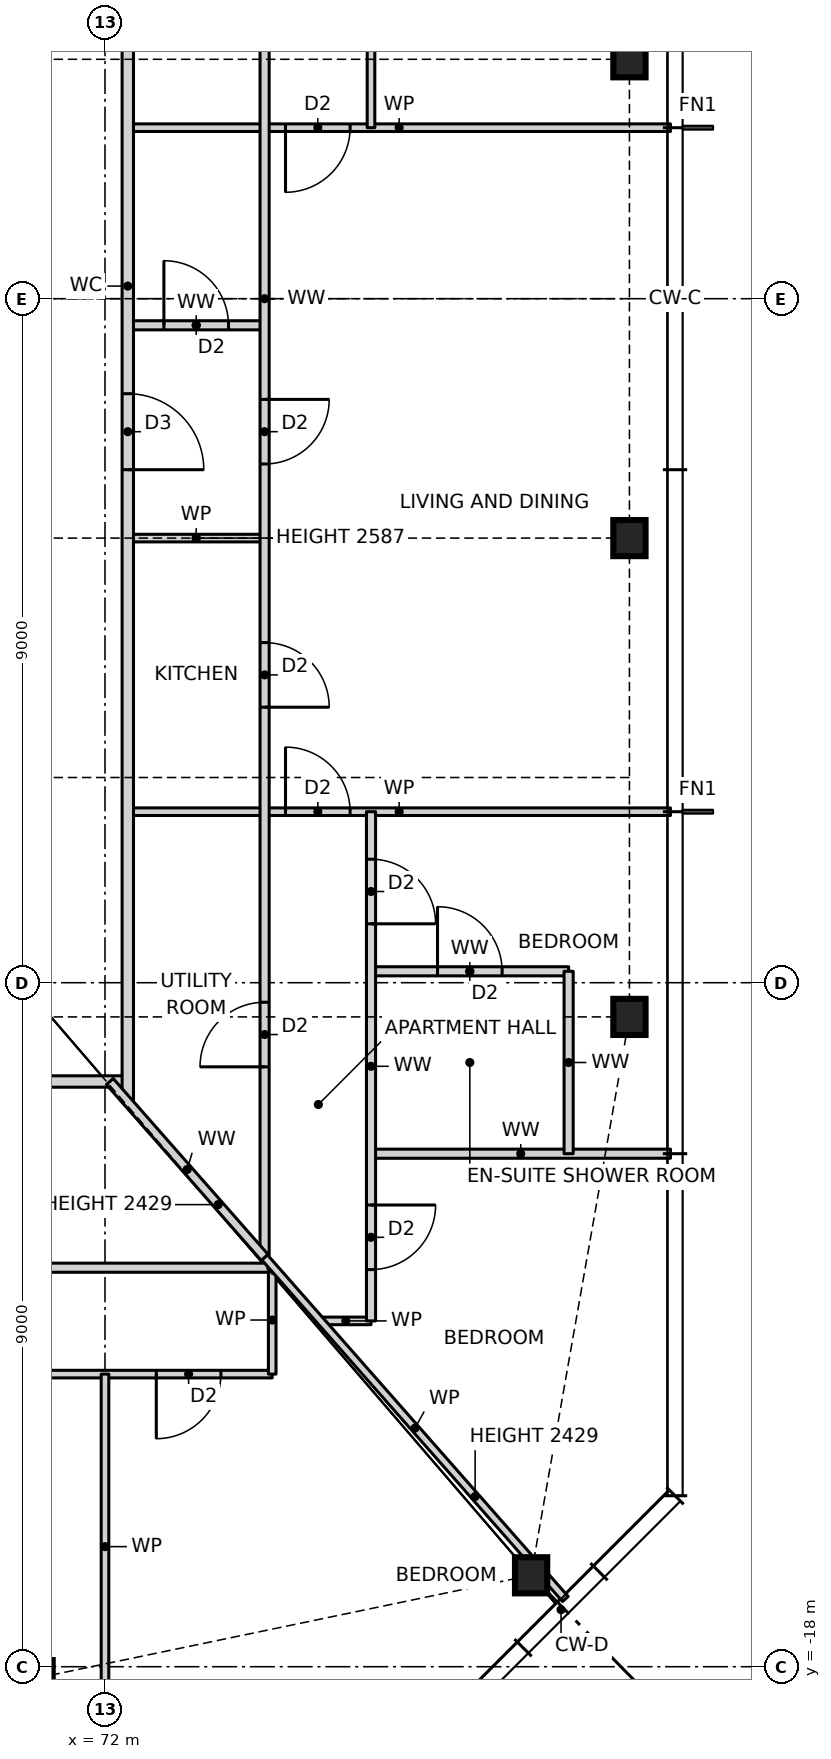
"""IFC4 building model, lengths in metres.
Left out: names, types, materials, properties, quantities, classifications, styles, units other than length and angle.
Written with IfcOpenShell. Run it as: python <this file> out.ifc"""

import sys

from ifc_helpers import new_model, si_unit, direction, frame, frame_2d, origin, origin_2d, place, context, subcontext, project, spatial, rectangle, i_section, extrude, element, fill, save


model = new_model("IFC4")
c1 = context("Model", 3, precision=1e-05, world=origin(), true_north=direction((0.0, 1.0)))
c2 = subcontext(c1, "Body", "Model", "MODEL_VIEW")
j1 = project(units=[si_unit("LENGTHUNIT", "METRE"), si_unit("PLANEANGLEUNIT", "RADIAN")], contexts=[c1])
p1 = place(None, origin())
s1 = spatial("IfcSite", under=j1, at=p1, CompositionType="ELEMENT")
p2 = place(p1, origin())
s2 = spatial("IfcBuilding", under=s1, at=p2, CompositionType="ELEMENT")
p3 = place(p2, frame((0.0, 0.0, 36.0)))
s3 = spatial("IfcBuildingStorey", under=s2, at=p3, CompositionType="ELEMENT", Elevation=36.0)
for number, where, z_axis, x_axis in (
    (1, (71.1, -18.15, 0.0), (0.0, 0.0, 1.0), (1.0, 0.0, 0.0)),
    (2, (77.606, -16.797, 0.0), (0.0, 0.0, 1.0), (1.0, 0.0, 0.0)),
    (3, (78.9, -9.45, 0.0), (0.0, 0.0, 1.0), (1.0, 0.0, 0.0)),
    (4, (78.9, -3.15, 0.0), (0.0, 0.0, 1.0), (1.0, 0.0, 0.0)),
    (5, (78.9, 3.15, 0.0), (0.0, 0.0, 1.0), (1.0, 0.0, 0.0)),
):
    element("IfcColumn", number, at=place(p3, frame(where, z_axis=z_axis, x_axis=x_axis)), inside=s3, PredefinedType="COLUMN", context=c2, shape_type="SweptSolid", body=[
        extrude(i_section(OverallWidth=0.424, OverallDepth=0.475, WebThickness=0.048, FlangeThickness=0.077, at=origin_2d()), origin(), (0.0, 0.0, 1.0), 3.5),
    ])
p4 = place(p3, frame((63.0, -14.15, 0.0), z_axis=(0.0, 0.0, 1.0), x_axis=(1.0, 0.0, 0.0)))
e6 = element("IfcWall", 6, at=p4, inside=s3, PredefinedType="PARTITIONING", context=c2, shape_type="SweptSolid", body=[
    extrude(rectangle(XDim=11.2, YDim=0.1, at=frame_2d((5.6, 0.0))), origin(), (0.0, 0.0, 1.0), 3.27),
])
p5 = place(p4, frame((1.825, 0.0, 0.0)))
e7 = element("IfcOpeningElement", 7, at=p5, cuts=e6, PredefinedType="OPENING", context=c2, shape_type="SweptSolid", body=[
    extrude(rectangle(XDim=0.85, YDim=2.1, at=frame_2d((0.425, 1.05))), frame((0.0, 0.06, 0.0), z_axis=(0.0, -1.0, 0.0), x_axis=(1.0, 0.0, 0.0)), (0.0, 0.0, 1.0), 0.12),
])
p6 = place(p4, frame((6.325, 0.0, 0.0)))
e8 = element("IfcOpeningElement", 8, at=p6, cuts=e6, PredefinedType="OPENING", context=c2, shape_type="SweptSolid", body=[
    extrude(rectangle(XDim=0.85, YDim=2.1, at=frame_2d((0.425, 1.05))), frame((0.0, 0.06, 0.0), z_axis=(0.0, -1.0, 0.0), x_axis=(1.0, 0.0, 0.0)), (0.0, 0.0, 1.0), 0.12),
])
p7 = place(p4, frame((9.675, 0.0, 0.0)))
e9 = element("IfcOpeningElement", 9, at=p7, cuts=e6, PredefinedType="OPENING", context=c2, shape_type="SweptSolid", body=[
    extrude(rectangle(XDim=0.85, YDim=2.1, at=frame_2d((0.425, 1.05))), frame((0.0, 0.06, 0.0), z_axis=(0.0, -1.0, 0.0), x_axis=(1.0, 0.0, 0.0)), (0.0, 0.0, 1.0), 0.12),
])
p8 = place(p3, frame((74.836, -13.45, 0.0), z_axis=(0.0, 0.0, 1.0), x_axis=(1.0, 0.0, 0.0)))
e10 = element("IfcWall", 10, at=p8, inside=s3, PredefinedType="PARTITIONING", context=c2, shape_type="SweptSolid", body=[
    extrude(rectangle(XDim=0.664, YDim=0.1, at=frame_2d((0.332, 0.0))), origin(), (0.0, 0.0, 1.0), 3.27),
])
p9 = place(p3, frame((54.0, -12.75, 0.0), z_axis=(0.0, 0.0, 1.0), x_axis=(1.0, 0.0, 0.0)))
e11 = element("IfcWall", 11, at=p9, inside=s3, PredefinedType="PARTITIONING", context=c2, shape_type="SweptSolid", body=[
    extrude(rectangle(XDim=20.2, YDim=0.12, at=frame_2d((10.1, 0.0))), origin(), (0.0, 0.0, 1.0), 3.27),
])
p10 = place(p9, frame((1.375, 0.0, 0.0)))
e12 = element("IfcOpeningElement", 12, at=p10, cuts=e11, PredefinedType="OPENING", context=c2, shape_type="SweptSolid", body=[
    extrude(rectangle(XDim=0.85, YDim=2.1, at=frame_2d((0.425, 1.05))), frame((0.0, 0.07, 0.0), z_axis=(0.0, -1.0, 0.0), x_axis=(1.0, 0.0, 0.0)), (0.0, 0.0, 1.0), 0.14),
])
p11 = place(p9, frame((4.575, 0.0, 0.0)))
e13 = element("IfcOpeningElement", 13, at=p11, cuts=e11, PredefinedType="OPENING", context=c2, shape_type="SweptSolid", body=[
    extrude(rectangle(XDim=0.85, YDim=2.1, at=frame_2d((0.425, 1.05))), frame((0.0, 0.07, 0.0), z_axis=(0.0, -1.0, 0.0), x_axis=(1.0, 0.0, 0.0)), (0.0, 0.0, 1.0), 0.14),
])
p12 = place(p9, frame((10.225, 0.0, 0.0)))
e14 = element("IfcOpeningElement", 14, at=p12, cuts=e11, PredefinedType="OPENING", context=c2, shape_type="SweptSolid", body=[
    extrude(rectangle(XDim=0.85, YDim=2.1, at=frame_2d((0.425, 1.05))), frame((0.0, 0.07, 0.0), z_axis=(0.0, -1.0, 0.0), x_axis=(1.0, 0.0, 0.0)), (0.0, 0.0, 1.0), 0.14),
])
p13 = place(p9, frame((15.825, 0.0, 0.0)))
e15 = element("IfcOpeningElement", 15, at=p13, cuts=e11, PredefinedType="OPENING", context=c2, shape_type="SweptSolid", body=[
    extrude(rectangle(XDim=0.85, YDim=2.1, at=frame_2d((0.425, 1.05))), frame((0.0, 0.07, 0.0), z_axis=(0.0, -1.0, 0.0), x_axis=(1.0, 0.0, 0.0)), (0.0, 0.0, 1.0), 0.14),
])
p14 = place(p3, frame((75.5, -11.25, 0.0), z_axis=(0.0, 0.0, 1.0), x_axis=(1.0, 0.0, 0.0)))
e16 = element("IfcWall", 16, at=p14, inside=s3, PredefinedType="PARTITIONING", context=c2, shape_type="SweptSolid", body=[
    extrude(rectangle(XDim=3.94, YDim=0.12, at=frame_2d((1.97, 0.0))), origin(), (0.0, 0.0, 1.0), 3.27),
])
p15 = place(p3, frame((53.7, -10.3, 0.0), z_axis=(0.0, 0.0, 1.0), x_axis=(1.0, 0.0, 0.0)))
e17 = element("IfcWall", 17, at=p15, inside=s3, PredefinedType="PARTITIONING", context=c2, shape_type="SweptSolid", body=[
    extrude(rectangle(XDim=18.6, YDim=0.15, at=frame_2d((9.3, 0.0))), origin(), (0.0, 0.0, 1.0), 3.27),
])
p16 = place(p15, frame((4.8, 0.0, 0.0)))
e18 = element("IfcOpeningElement", 18, at=p16, cuts=e17, PredefinedType="OPENING", context=c2, shape_type="SweptSolid", body=[
    extrude(rectangle(XDim=1.0, YDim=2.1, at=frame_2d((0.5, 1.05))), frame((0.0, 0.085, 0.0), z_axis=(0.0, -1.0, 0.0), x_axis=(1.0, 0.0, 0.0)), (0.0, 0.0, 1.0), 0.17),
])
p17 = place(p3, frame((75.5, -8.85, 0.0), z_axis=(0.0, 0.0, 1.0), x_axis=(1.0, 0.0, 0.0)))
e19 = element("IfcWall", 19, at=p17, inside=s3, PredefinedType="PARTITIONING", context=c2, shape_type="SweptSolid", body=[
    extrude(rectangle(XDim=2.6, YDim=0.12, at=frame_2d((1.3, 0.0))), origin(), (0.0, 0.0, 1.0), 3.27),
])
p18 = place(p17, frame((0.875, 0.0, 0.0)))
e20 = element("IfcOpeningElement", 20, at=p18, cuts=e19, PredefinedType="OPENING", context=c2, shape_type="SweptSolid", body=[
    extrude(rectangle(XDim=0.85, YDim=2.1, at=frame_2d((0.425, 1.05))), frame((0.0, 0.07, 0.0), z_axis=(0.0, -1.0, 0.0), x_axis=(1.0, 0.0, 0.0)), (0.0, 0.0, 1.0), 0.14),
])
p19 = place(p3, frame((72.3, -6.75, 0.0), z_axis=(0.0, 0.0, 1.0), x_axis=(1.0, 0.0, 0.0)))
e21 = element("IfcWall", 21, at=p19, inside=s3, PredefinedType="PARTITIONING", context=c2, shape_type="SweptSolid", body=[
    extrude(rectangle(XDim=7.14, YDim=0.1, at=frame_2d((3.57, 0.0))), origin(), (0.0, 0.0, 1.0), 3.27),
])
p20 = place(p19, frame((2.075, 0.0, 0.0)))
e22 = element("IfcOpeningElement", 22, at=p20, cuts=e21, PredefinedType="OPENING", context=c2, shape_type="SweptSolid", body=[
    extrude(rectangle(XDim=0.85, YDim=2.1, at=frame_2d((0.425, 1.05))), frame((0.0, 0.06, 0.0), z_axis=(0.0, -1.0, 0.0), x_axis=(1.0, 0.0, 0.0)), (0.0, 0.0, 1.0), 0.12),
])
p21 = place(p3, frame((72.3, -3.15, 0.0), z_axis=(0.0, 0.0, 1.0), x_axis=(1.0, 0.0, 0.0)))
e23 = element("IfcWall", 23, at=p21, inside=s3, PredefinedType="PARTITIONING", context=c2, shape_type="SweptSolid", body=[
    extrude(rectangle(XDim=1.8, YDim=0.1, at=frame_2d((0.9, 0.0))), origin(), (0.0, 0.0, 1.0), 2.587),
])
p22 = place(p3, frame((72.3, -0.35, 0.0), z_axis=(0.0, 0.0, 1.0), x_axis=(1.0, 0.0, 0.0)))
e24 = element("IfcWall", 24, at=p22, inside=s3, PredefinedType="PARTITIONING", context=c2, shape_type="SweptSolid", body=[
    extrude(rectangle(XDim=1.8, YDim=0.12, at=frame_2d((0.9, 0.0))), origin(), (0.0, 0.0, 1.0), 3.27),
])
p23 = place(p22, frame((0.475, 0.0, 0.0)))
e25 = element("IfcOpeningElement", 25, at=p23, cuts=e24, PredefinedType="OPENING", context=c2, shape_type="SweptSolid", body=[
    extrude(rectangle(XDim=0.85, YDim=2.1, at=frame_2d((0.425, 1.05))), frame((0.0, 0.07, 0.0), z_axis=(0.0, -1.0, 0.0), x_axis=(1.0, 0.0, 0.0)), (0.0, 0.0, 1.0), 0.14),
])
p24 = place(p3, frame((72.3, 2.25, 0.0), z_axis=(0.0, 0.0, 1.0), x_axis=(1.0, 0.0, 0.0)))
e26 = element("IfcWall", 26, at=p24, inside=s3, PredefinedType="PARTITIONING", context=c2, shape_type="SweptSolid", body=[
    extrude(rectangle(XDim=7.14, YDim=0.1, at=frame_2d((3.57, 0.0))), origin(), (0.0, 0.0, 1.0), 3.27),
])
p25 = place(p24, frame((2.075, 0.0, 0.0)))
e27 = element("IfcOpeningElement", 27, at=p25, cuts=e26, PredefinedType="OPENING", context=c2, shape_type="SweptSolid", body=[
    extrude(rectangle(XDim=0.85, YDim=2.1, at=frame_2d((0.425, 1.05))), frame((0.0, 0.06, 0.0), z_axis=(0.0, -1.0, 0.0), x_axis=(1.0, 0.0, 0.0)), (0.0, 0.0, 1.0), 0.12),
])
p26 = place(p3, frame((78.1, -11.25, 0.0), z_axis=(0.0, 0.0, 1.0), x_axis=(0.0, 1.0, 0.0)))
e28 = element("IfcWall", 28, at=p26, inside=s3, PredefinedType="PARTITIONING", context=c2, shape_type="SweptSolid", body=[
    extrude(rectangle(XDim=2.4, YDim=0.12, at=frame_2d((1.2, 0.0))), origin(), (0.0, 0.0, 1.0), 3.27),
])
p27 = place(p3, frame((75.5, -13.45, 0.0), z_axis=(0.0, 0.0, 1.0), x_axis=(0.0, 1.0, 0.0)))
e29 = element("IfcWall", 29, at=p27, inside=s3, PredefinedType="PARTITIONING", context=c2, shape_type="SweptSolid", body=[
    extrude(rectangle(XDim=6.7, YDim=0.12, at=frame_2d((3.35, 0.0))), origin(), (0.0, 0.0, 1.0), 3.27),
])
p28 = place(p27, frame((5.225, 0.0, 0.0)))
e30 = element("IfcOpeningElement", 30, at=p28, cuts=e29, PredefinedType="OPENING", context=c2, shape_type="SweptSolid", body=[
    extrude(rectangle(XDim=0.85, YDim=2.1, at=frame_2d((0.425, 1.05))), frame((0.0, 0.07, 0.0), z_axis=(0.0, -1.0, 0.0), x_axis=(1.0, 0.0, 0.0)), (0.0, 0.0, 1.0), 0.14),
])
p29 = place(p27, frame((0.675, 0.0, 0.0)))
e31 = element("IfcOpeningElement", 31, at=p29, cuts=e29, PredefinedType="OPENING", context=c2, shape_type="SweptSolid", body=[
    extrude(rectangle(XDim=0.85, YDim=2.1, at=frame_2d((0.425, 1.05))), frame((0.0, 0.07, 0.0), z_axis=(0.0, -1.0, 0.0), x_axis=(1.0, 0.0, 0.0)), (0.0, 0.0, 1.0), 0.14),
])
p30 = place(p3, frame((75.5, 2.25, 0.0), z_axis=(0.0, 0.0, 1.0), x_axis=(0.0, 1.0, 0.0)))
e32 = element("IfcWall", 32, at=p30, inside=s3, PredefinedType="PARTITIONING", context=c2, shape_type="SweptSolid", body=[
    extrude(rectangle(XDim=11.2, YDim=0.1, at=frame_2d((5.6, 0.0))), origin(), (0.0, 0.0, 1.0), 3.27),
])
p31 = place(p30, frame((1.825, 0.0, 0.0)))
e33 = element("IfcOpeningElement", 33, at=p31, cuts=e32, PredefinedType="OPENING", context=c2, shape_type="SweptSolid", body=[
    extrude(rectangle(XDim=0.85, YDim=2.1, at=frame_2d((0.425, 1.05))), frame((0.0, 0.06, 0.0), z_axis=(0.0, -1.0, 0.0), x_axis=(1.0, 0.0, 0.0)), (0.0, 0.0, 1.0), 0.12),
])
p32 = place(p30, frame((6.325, 0.0, 0.0)))
e34 = element("IfcOpeningElement", 34, at=p32, cuts=e32, PredefinedType="OPENING", context=c2, shape_type="SweptSolid", body=[
    extrude(rectangle(XDim=0.85, YDim=2.1, at=frame_2d((0.425, 1.05))), frame((0.0, 0.06, 0.0), z_axis=(0.0, -1.0, 0.0), x_axis=(1.0, 0.0, 0.0)), (0.0, 0.0, 1.0), 0.12),
])
p33 = place(p30, frame((9.675, 0.0, 0.0)))
e35 = element("IfcOpeningElement", 35, at=p33, cuts=e32, PredefinedType="OPENING", context=c2, shape_type="SweptSolid", body=[
    extrude(rectangle(XDim=0.85, YDim=2.1, at=frame_2d((0.425, 1.05))), frame((0.0, 0.06, 0.0), z_axis=(0.0, -1.0, 0.0), x_axis=(1.0, 0.0, 0.0)), (0.0, 0.0, 1.0), 0.12),
])
p34 = place(p3, frame((74.2, -14.15, 0.0), z_axis=(0.0, 0.0, 1.0), x_axis=(0.0, 1.0, 0.0)))
e36 = element("IfcWall", 36, at=p34, inside=s3, PredefinedType="PARTITIONING", context=c2, shape_type="SweptSolid", body=[
    extrude(rectangle(XDim=1.423, YDim=0.1, at=frame_2d((0.711, 0.0))), origin(), (0.0, 0.0, 1.0), 3.27),
])
p35 = place(p3, frame((74.1, -12.614, 0.0), z_axis=(0.0, 0.0, 1.0), x_axis=(0.0, 1.0, 0.0)))
e37 = element("IfcWall", 37, at=p35, inside=s3, PredefinedType="PARTITIONING", context=c2, shape_type="SweptSolid", body=[
    extrude(rectangle(XDim=25.228, YDim=0.12, at=frame_2d((12.614, 0.0))), origin(), (0.0, 0.0, 1.0), 3.27),
])
p36 = place(p35, frame((7.239, 0.0, 0.0)))
e38 = element("IfcOpeningElement", 38, at=p36, cuts=e37, PredefinedType="OPENING", context=c2, shape_type="SweptSolid", body=[
    extrude(rectangle(XDim=0.85, YDim=2.1, at=frame_2d((0.425, 1.05))), frame((0.0, 0.07, 0.0), z_axis=(0.0, -1.0, 0.0), x_axis=(1.0, 0.0, 0.0)), (0.0, 0.0, 1.0), 0.14),
])
p37 = place(p35, frame((10.439, 0.0, 0.0)))
e39 = element("IfcOpeningElement", 39, at=p37, cuts=e37, PredefinedType="OPENING", context=c2, shape_type="SweptSolid", body=[
    extrude(rectangle(XDim=0.85, YDim=2.1, at=frame_2d((0.425, 1.05))), frame((0.0, 0.07, 0.0), z_axis=(0.0, -1.0, 0.0), x_axis=(1.0, 0.0, 0.0)), (0.0, 0.0, 1.0), 0.14),
])
p38 = place(p35, frame((2.507, 0.0, 0.0)))
e40 = element("IfcOpeningElement", 40, at=p38, cuts=e37, PredefinedType="OPENING", context=c2, shape_type="SweptSolid", body=[
    extrude(rectangle(XDim=0.85, YDim=2.1, at=frame_2d((0.425, 1.05))), frame((0.0, 0.07, 0.0), z_axis=(0.0, -1.0, 0.0), x_axis=(1.0, 0.0, 0.0)), (0.0, 0.0, 1.0), 0.14),
])
p39 = place(p35, frame((16.639, 0.0, 0.0)))
e41 = element("IfcOpeningElement", 41, at=p39, cuts=e37, PredefinedType="OPENING", context=c2, shape_type="SweptSolid", body=[
    extrude(rectangle(XDim=0.85, YDim=2.1, at=frame_2d((0.425, 1.05))), frame((0.0, 0.07, 0.0), z_axis=(0.0, -1.0, 0.0), x_axis=(1.0, 0.0, 0.0)), (0.0, 0.0, 1.0), 0.14),
])
p40 = place(p35, frame((21.821, 0.0, 0.0)))
e42 = element("IfcOpeningElement", 42, at=p40, cuts=e37, PredefinedType="OPENING", context=c2, shape_type="SweptSolid", body=[
    extrude(rectangle(XDim=0.85, YDim=2.1, at=frame_2d((0.425, 1.05))), frame((0.0, 0.07, 0.0), z_axis=(0.0, -1.0, 0.0), x_axis=(1.0, 0.0, 0.0)), (0.0, 0.0, 1.0), 0.14),
])
p41 = place(p3, frame((72.3, -10.568, 0.0), z_axis=(0.0, 0.0, 1.0), x_axis=(0.0, 1.0, 0.0)))
e43 = element("IfcWall", 43, at=p41, inside=s3, PredefinedType="PARTITIONING", context=c2, shape_type="SweptSolid", body=[
    extrude(rectangle(XDim=21.468, YDim=0.15, at=frame_2d((10.734, 0.0))), origin(), (0.0, 0.0, 1.0), 3.27),
])
p42 = place(p41, frame((8.318, 0.0, 0.0)))
e44 = element("IfcOpeningElement", 44, at=p42, cuts=e43, PredefinedType="OPENING", context=c2, shape_type="SweptSolid", body=[
    extrude(rectangle(XDim=1.0, YDim=2.1, at=frame_2d((0.5, 1.05))), frame((0.0, 0.085, 0.0), z_axis=(0.0, -1.0, 0.0), x_axis=(1.0, 0.0, 0.0)), (0.0, 0.0, 1.0), 0.17),
])
p43 = place(p3, frame((72.0, -18.69, 0.0), z_axis=(0.0, 0.0, 1.0), x_axis=(0.0, 1.0, 0.0)))
e45 = element("IfcWall", 45, at=p43, inside=s3, PredefinedType="PARTITIONING", context=c2, shape_type="SweptSolid", body=[
    extrude(rectangle(XDim=4.54, YDim=0.1, at=frame_2d((2.27, 0.0))), origin(), (0.0, 0.0, 1.0), 3.27),
])
p44 = place(p3, frame((78.057, -17.109, 0.0), z_axis=(0.0, 0.0, 1.0), x_axis=(-0.660775837956, 0.750583301156, 0.0)))
e46 = element("IfcWall", 46, at=p44, inside=s3, PredefinedType="PARTITIONING", context=c2, shape_type="SweptSolid", body=[
    extrude(rectangle(XDim=5.989, YDim=0.1, at=frame_2d((2.994, 0.0))), origin(), (0.0, 0.0, 1.0), 2.429),
])
p45 = place(p3, frame((74.1, -12.614, 0.0), z_axis=(0.0, 0.0, 1.0), x_axis=(-0.660767161141, 0.750590939699, 0.0)))
e47 = element("IfcWall", 47, at=p45, inside=s3, PredefinedType="PARTITIONING", context=c2, shape_type="SweptSolid", body=[
    extrude(rectangle(XDim=3.082, YDim=0.12, at=frame_2d((1.541, 0.0))), origin(), (0.0, 0.0, 1.0), 2.429),
])
p46 = place(p7, frame((0.85, 0.0, 0.0), z_axis=(0.0, 0.0, 1.0), x_axis=(-1.0, 0.0, 0.0)))
e48 = element("IfcDoor", 48, at=p46, inside=s3, OperationType="SINGLE_SWING_RIGHT", PredefinedType="DOOR", context=c2, shape_type="SweptSolid", body=[
    extrude(rectangle(XDim=0.85, YDim=2.1, at=frame_2d((0.425, 1.05))), frame((0.0, 0.025, 0.0), z_axis=(0.0, -1.0, 0.0), x_axis=(1.0, 0.0, 0.0)), (0.0, 0.0, 1.0), 0.05),
])
fill(e9, e48)
p47 = place(p36, frame((0.85, 0.0, 0.0), z_axis=(0.0, 0.0, 1.0), x_axis=(-1.0, 0.0, 0.0)))
e49 = element("IfcDoor", 49, at=p47, inside=s3, OperationType="SINGLE_SWING_RIGHT", PredefinedType="DOOR", context=c2, shape_type="SweptSolid", body=[
    extrude(rectangle(XDim=0.85, YDim=2.1, at=frame_2d((0.425, 1.05))), frame((0.0, 0.025, 0.0), z_axis=(0.0, -1.0, 0.0), x_axis=(1.0, 0.0, 0.0)), (0.0, 0.0, 1.0), 0.05),
])
fill(e38, e49)
p48 = place(p42, frame((1.0, 0.0, 0.0), z_axis=(0.0, 0.0, 1.0), x_axis=(-1.0, 0.0, 0.0)))
e50 = element("IfcDoor", 50, at=p48, inside=s3, OperationType="SINGLE_SWING_RIGHT", PredefinedType="DOOR", context=c2, shape_type="SweptSolid", body=[
    extrude(rectangle(XDim=1.0, YDim=2.1, at=frame_2d((0.5, 1.05))), frame((0.0, 0.025, 0.0), z_axis=(0.0, -1.0, 0.0), x_axis=(1.0, 0.0, 0.0)), (0.0, 0.0, 1.0), 0.05),
])
fill(e44, e50)
p49 = place(p37, frame((0.85, 0.0, 0.0), z_axis=(0.0, 0.0, 1.0), x_axis=(-1.0, 0.0, 0.0)))
e51 = element("IfcDoor", 51, at=p49, inside=s3, OperationType="SINGLE_SWING_LEFT", PredefinedType="DOOR", context=c2, shape_type="SweptSolid", body=[
    extrude(rectangle(XDim=0.85, YDim=2.1, at=frame_2d((0.425, 1.05))), frame((0.0, 0.025, 0.0), z_axis=(0.0, -1.0, 0.0), x_axis=(1.0, 0.0, 0.0)), (0.0, 0.0, 1.0), 0.05),
])
fill(e39, e51)
p50 = place(p23, origin())
e52 = element("IfcDoor", 52, at=p50, inside=s3, OperationType="SINGLE_SWING_LEFT", PredefinedType="DOOR", context=c2, shape_type="SweptSolid", body=[
    extrude(rectangle(XDim=0.85, YDim=2.1, at=frame_2d((0.425, 1.05))), frame((0.0, 0.025, 0.0), z_axis=(0.0, -1.0, 0.0), x_axis=(1.0, 0.0, 0.0)), (0.0, 0.0, 1.0), 0.05),
])
fill(e25, e52)
p51 = place(p20, origin())
e53 = element("IfcDoor", 53, at=p51, inside=s3, OperationType="SINGLE_SWING_LEFT", PredefinedType="DOOR", context=c2, shape_type="SweptSolid", body=[
    extrude(rectangle(XDim=0.85, YDim=2.1, at=frame_2d((0.425, 1.05))), frame((0.0, 0.025, 0.0), z_axis=(0.0, -1.0, 0.0), x_axis=(1.0, 0.0, 0.0)), (0.0, 0.0, 1.0), 0.05),
])
fill(e22, e53)
p52 = place(p18, origin())
e54 = element("IfcDoor", 54, at=p52, inside=s3, OperationType="SINGLE_SWING_LEFT", PredefinedType="DOOR", context=c2, shape_type="SweptSolid", body=[
    extrude(rectangle(XDim=0.85, YDim=2.1, at=frame_2d((0.425, 1.05))), frame((0.0, 0.025, 0.0), z_axis=(0.0, -1.0, 0.0), x_axis=(1.0, 0.0, 0.0)), (0.0, 0.0, 1.0), 0.05),
])
fill(e20, e54)
p53 = place(p28, frame((0.85, 0.0, 0.0), z_axis=(0.0, 0.0, 1.0), x_axis=(-1.0, 0.0, 0.0)))
e55 = element("IfcDoor", 55, at=p53, inside=s3, OperationType="SINGLE_SWING_RIGHT", PredefinedType="DOOR", context=c2, shape_type="SweptSolid", body=[
    extrude(rectangle(XDim=0.85, YDim=2.1, at=frame_2d((0.425, 1.05))), frame((0.0, 0.025, 0.0), z_axis=(0.0, -1.0, 0.0), x_axis=(1.0, 0.0, 0.0)), (0.0, 0.0, 1.0), 0.05),
])
fill(e30, e55)
p54 = place(p29, frame((0.85, 0.0, 0.0), z_axis=(0.0, 0.0, 1.0), x_axis=(-1.0, 0.0, 0.0)))
e56 = element("IfcDoor", 56, at=p54, inside=s3, OperationType="SINGLE_SWING_LEFT", PredefinedType="DOOR", context=c2, shape_type="SweptSolid", body=[
    extrude(rectangle(XDim=0.85, YDim=2.1, at=frame_2d((0.425, 1.05))), frame((0.0, 0.025, 0.0), z_axis=(0.0, -1.0, 0.0), x_axis=(1.0, 0.0, 0.0)), (0.0, 0.0, 1.0), 0.05),
])
fill(e31, e56)
p55 = place(p38, origin())
e57 = element("IfcDoor", 57, at=p55, inside=s3, OperationType="SINGLE_SWING_LEFT", PredefinedType="DOOR", context=c2, shape_type="SweptSolid", body=[
    extrude(rectangle(XDim=0.85, YDim=2.1, at=frame_2d((0.425, 1.05))), frame((0.0, 0.025, 0.0), z_axis=(0.0, -1.0, 0.0), x_axis=(1.0, 0.0, 0.0)), (0.0, 0.0, 1.0), 0.05),
])
fill(e40, e57)
p56 = place(p25, frame((0.85, 0.0, 0.0), z_axis=(0.0, 0.0, 1.0), x_axis=(-1.0, 0.0, 0.0)))
e58 = element("IfcDoor", 58, at=p56, inside=s3, OperationType="SINGLE_SWING_RIGHT", PredefinedType="DOOR", context=c2, shape_type="SweptSolid", body=[
    extrude(rectangle(XDim=0.85, YDim=2.1, at=frame_2d((0.425, 1.05))), frame((0.0, 0.025, 0.0), z_axis=(0.0, -1.0, 0.0), x_axis=(1.0, 0.0, 0.0)), (0.0, 0.0, 1.0), 0.05),
])
fill(e27, e58)
save(model, sys.argv[1])
